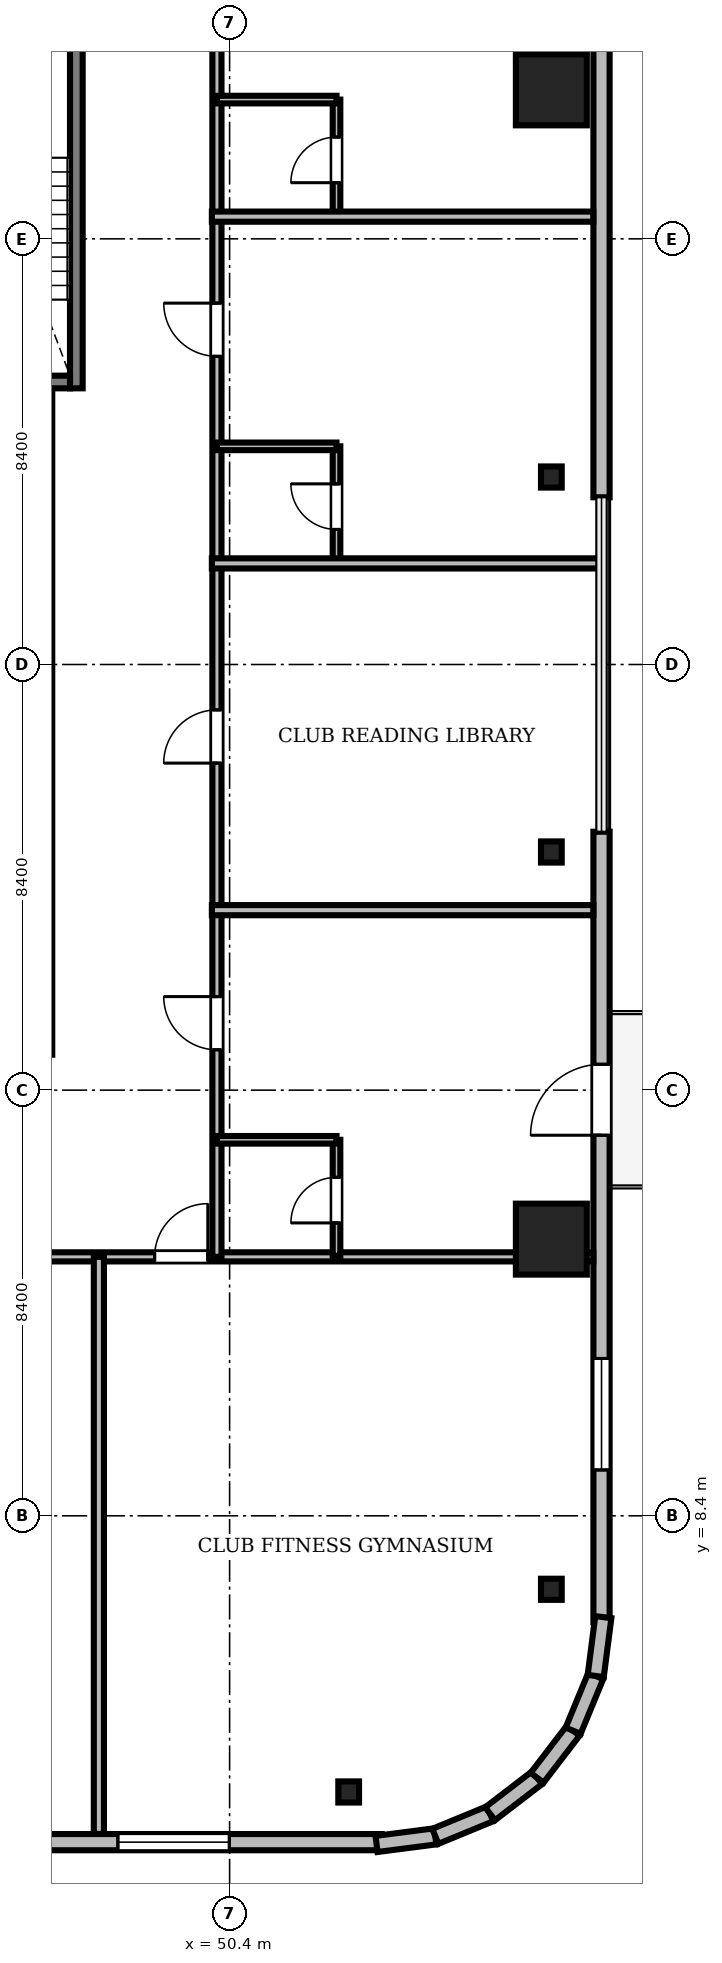
"""IFC4 building model, lengths in metres.
Left out: names, types, materials, properties, quantities, classifications, styles, units other than length and angle.
Written with IfcOpenShell. Run it as: python <this file> out.ifc"""

import sys

from ifc_helpers import new_model, si_unit, direction, frame, frame_2d, origin, origin_2d, place, context, subcontext, project, spatial, rectangle, i_section, extrude, source, transform, mapped, element, fill, save


model = new_model("IFC4")
c1 = context("Model", 3, precision=1e-05, world=origin(), true_north=direction((0.0, 1.0)))
c2 = subcontext(c1, "Body", "Model", "MODEL_VIEW")
j1 = project(units=[si_unit("LENGTHUNIT", "METRE"), si_unit("PLANEANGLEUNIT", "RADIAN")], contexts=[c1])
p1 = place(None, origin())
s1 = spatial("IfcSite", under=j1, at=p1, CompositionType="ELEMENT")
p2 = place(p1, origin())
s2 = spatial("IfcBuilding", under=s1, at=p2, CompositionType="ELEMENT")
p3 = place(p2, frame((0.0, 0.0, 214.8)))
s3 = spatial("IfcBuildingStorey", under=s2, at=p3, CompositionType="ELEMENT", Elevation=214.8)
m1 = source(origin(), c2, "Body", "SweptSolid", [
    extrude(rectangle(XDim=13.15, YDim=0.8, at=frame_2d((6.575, 0.0))), origin(), (0.0, 0.0, 1.0), 3.53),
])
p4 = place(p3, frame((46.5, 17.5, 0.0), z_axis=(0.0, 0.0, 1.0), x_axis=(0.0, 1.0, 0.0)))
e1 = element("IfcWall", 1, at=p4, inside=s3, PredefinedType="SHEAR", context=c2, shape_type="MappedRepresentation", body=[
    mapped(m1, transform((0.0, 0.0, 0.0), scale=1.0)),
])
m2 = source(origin(), c2, "Body", "SweptSolid", [
    extrude(rectangle(XDim=1.4, YDim=1.4, at=origin_2d()), origin(), (0.0, 0.0, 1.0), 3.53),
])
for number, where, z_axis, x_axis in (
    (2, (56.75, 13.86, 0.0), (0.0, 0.0, 1.0), (1.0, 0.0, 0.0)),
    (3, (56.75, 36.54, 0.0), (0.0, 0.0, 1.0), (1.0, 0.0, 0.0)),
):
    element("IfcColumn", number, at=place(p3, frame(where, z_axis=z_axis, x_axis=x_axis)), inside=s3, PredefinedType="COLUMN", context=c2, shape_type="MappedRepresentation", body=[
        mapped(m2, transform((0.0, 0.0, 0.0), scale=1.0)),
    ])
m3 = source(origin(), c2, "Body", "SweptSolid", [
    extrude(i_section(OverallWidth=0.409, OverallDepth=0.417, WebThickness=0.021, FlangeThickness=0.033, FilletRadius=0.015, at=origin_2d()), origin(), (0.0, 0.0, 1.0), 3.53),
])
for number, where, z_axis, x_axis in (
    (4, (52.75, 2.95, 0.0), (0.0, 0.0, 1.0), (1.0, 0.0, 0.0)),
    (5, (56.75, 6.95, 0.0), (0.0, 0.0, 1.0), (1.0, 0.0, 0.0)),
    (6, (56.75, 21.5, 0.0), (0.0, 0.0, 1.0), (1.0, 0.0, 0.0)),
    (7, (56.75, 28.9, 0.0), (0.0, 0.0, 1.0), (1.0, 0.0, 0.0)),
):
    element("IfcColumn", number, at=place(p3, frame(where, z_axis=z_axis, x_axis=x_axis)), inside=s3, PredefinedType="COLUMN", context=c2, shape_type="MappedRepresentation", body=[
        mapped(m3, transform((0.0, 0.0, 0.0), scale=1.0)),
    ])
m4 = source(origin(), c2, "Body", "SweptSolid", [
    extrude(rectangle(XDim=15.6, YDim=0.32, at=frame_2d((7.8, 0.0))), origin(), (0.0, 0.0, 1.0), 3.53),
])
p5 = place(p3, frame((37.8, 1.96, 0.0), z_axis=(0.0, 0.0, 1.0), x_axis=(1.0, 0.0, 0.0)))
e8 = element("IfcWall", 8, at=p5, inside=s3, PredefinedType="SOLIDWALL", context=c2, shape_type="MappedRepresentation", body=[
    mapped(m4, transform((0.0, 0.0, 0.0), scale=1.0)),
])
m5 = source(origin(), c2, "Body", "SweptSolid", [
    extrude(rectangle(XDim=1.4, YDim=2.3, at=frame_2d((0.7, 1.15))), frame((0.0, 0.17, 0.0), z_axis=(0.0, -1.0, 0.0), x_axis=(1.0, 0.0, 0.0)), (0.0, 0.0, 1.0), 0.34),
])
p6 = place(p5, frame((4.59, 0.0, 0.0)))
e9 = element("IfcOpeningElement", 9, at=p6, cuts=e8, PredefinedType="OPENING", context=c2, shape_type="MappedRepresentation", body=[
    mapped(m5, transform((0.0, 0.0, 0.0), scale=1.0)),
])
m6 = source(origin(), c2, "Body", "SweptSolid", [
    extrude(rectangle(XDim=2.2, YDim=2.4, at=frame_2d((1.1, 1.2))), frame((0.0, 0.17, 0.0), z_axis=(0.0, -1.0, 0.0), x_axis=(1.0, 0.0, 0.0)), (0.0, 0.0, 1.0), 0.34),
])
p7 = place(p5, frame((10.395, 0.0, 0.72)))
e10 = element("IfcOpeningElement", 10, at=p7, cuts=e8, PredefinedType="OPENING", context=c2, shape_type="MappedRepresentation", body=[
    mapped(m6, transform((0.0, 0.0, 0.0), scale=1.0)),
])
p8 = place(p3, frame((57.74, 6.3, 0.0), z_axis=(0.0, 0.0, 1.0), x_axis=(0.0, 1.0, 0.0)))
e11 = element("IfcWall", 11, at=p8, inside=s3, PredefinedType="SOLIDWALL", context=c2, shape_type="MappedRepresentation", body=[
    mapped(m4, transform((0.0, 0.0, 0.0), scale=1.0)),
])
p9 = place(p8, frame((9.61, 0.0, 0.0)))
e12 = element("IfcOpeningElement", 12, at=p9, cuts=e11, PredefinedType="OPENING", context=c2, shape_type="MappedRepresentation", body=[
    mapped(m5, transform((0.0, 0.0, 0.0), scale=1.0)),
])
p10 = place(p8, frame((3.005, 0.0, 0.72)))
e13 = element("IfcOpeningElement", 13, at=p10, cuts=e11, PredefinedType="OPENING", context=c2, shape_type="MappedRepresentation", body=[
    mapped(m6, transform((0.0, 0.0, 0.0), scale=1.0)),
])
m7 = source(origin(), c2, "Body", "SweptSolid", [
    extrude(rectangle(XDim=15.6, YDim=0.32, at=frame_2d((7.8, 0.0))), origin(), (0.0, 0.0, 1.0), 3.53),
])
p11 = place(p3, frame((57.74, 28.5, 0.0), z_axis=(0.0, 0.0, 1.0), x_axis=(0.0, 1.0, 0.0)))
e14 = element("IfcWall", 14, at=p11, inside=s3, PredefinedType="SOLIDWALL", context=c2, shape_type="MappedRepresentation", body=[
    mapped(m7, transform((0.0, 0.0, 0.0), scale=1.0)),
])
p12 = place(p11, frame((10.395, 0.0, 0.72)))
e15 = element("IfcOpeningElement", 15, at=p12, cuts=e14, PredefinedType="OPENING", context=c2, shape_type="MappedRepresentation", body=[
    mapped(m6, transform((0.0, 0.0, 0.0), scale=1.0)),
])
m8 = source(origin(), c2, "Body", "SweptSolid", [
    extrude(rectangle(XDim=1.17, YDim=0.32, at=frame_2d((0.585, 0.0))), origin(), (0.0, 0.0, 1.0), 3.53),
])
p13 = place(p3, frame((53.3, 1.925, 0.0), z_axis=(0.0, 0.0, 1.0), x_axis=(0.991762485493, 0.128090485085, 0.0)))
e16 = element("IfcWall", 16, at=p13, inside=s3, PredefinedType="SOLIDWALL", context=c2, shape_type="MappedRepresentation", body=[
    mapped(m8, transform((0.0, 0.0, 0.0), scale=1.0)),
])
m9 = source(origin(), c2, "Body", "SweptSolid", [
    extrude(rectangle(XDim=1.169, YDim=0.32, at=frame_2d((0.585, 0.0))), origin(), (0.0, 0.0, 1.0), 3.53),
])
p14 = place(p3, frame((54.46, 2.074, 0.0), z_axis=(0.0, 0.0, 1.0), x_axis=(0.924479075121, 0.381232789334, 0.0)))
e17 = element("IfcWall", 17, at=p14, inside=s3, PredefinedType="SOLIDWALL", context=c2, shape_type="MappedRepresentation", body=[
    mapped(m9, transform((0.0, 0.0, 0.0), scale=1.0)),
])
m10 = source(origin(), c2, "Body", "SweptSolid", [
    extrude(rectangle(XDim=1.169, YDim=0.32, at=frame_2d((0.584, 0.0))), origin(), (0.0, 0.0, 1.0), 3.53),
])
p15 = place(p3, frame((55.541, 2.52, 0.0), z_axis=(0.0, 0.0, 1.0), x_axis=(0.793663520347, 0.608356981114, 0.0)))
e18 = element("IfcWall", 18, at=p15, inside=s3, PredefinedType="SOLIDWALL", context=c2, shape_type="MappedRepresentation", body=[
    mapped(m10, transform((0.0, 0.0, 0.0), scale=1.0)),
])
m11 = source(origin(), c2, "Body", "SweptSolid", [
    extrude(rectangle(XDim=1.169, YDim=0.32, at=frame_2d((0.584, 0.0))), origin(), (0.0, 0.0, 1.0), 3.53),
])
for number, where, z_axis, x_axis in (
    (19, (56.469, 3.231, 0.0), (0.0, 0.0, 1.0), (0.608, 0.794, 0.0)),
    (20, (57.18, 4.159, 0.0), (0.0, 0.0, 1.0), (0.381, 0.925, 0.0)),
):
    element("IfcWall", number, at=place(p3, frame(where, z_axis=z_axis, x_axis=x_axis)), inside=s3, PredefinedType="SOLIDWALL", context=c2, shape_type="MappedRepresentation", body=[
        mapped(m11, transform((0.0, 0.0, 0.0), scale=1.0)),
    ])
m12 = source(origin(), c2, "Body", "SweptSolid", [
    extrude(rectangle(XDim=1.171, YDim=0.32, at=frame_2d((0.585, 0.0))), origin(), (0.0, 0.0, 1.0), 3.53),
])
p16 = place(p3, frame((57.625, 5.24, 0.0), z_axis=(0.0, 0.0, 1.0), x_axis=(0.128269133229, 0.991739395941, 0.0)))
e21 = element("IfcWall", 21, at=p16, inside=s3, PredefinedType="SOLIDWALL", context=c2, shape_type="MappedRepresentation", body=[
    mapped(m12, transform((0.0, 0.0, 0.0), scale=1.0)),
])
m13 = source(origin(), c2, "Body", "SweptSolid", [
    extrude(rectangle(XDim=9.25, YDim=0.25, at=frame_2d((4.625, 0.0))), origin(), (0.0, 0.0, 1.0), 3.55),
])
p17 = place(p3, frame((47.375, 30.65, 0.0), z_axis=(0.0, 0.0, 1.0), x_axis=(0.0, 1.0, 0.0)))
e22 = element("IfcWall", 22, at=p17, inside=s3, PredefinedType="SOLIDWALL", context=c2, shape_type="MappedRepresentation", body=[
    mapped(m13, transform((0.0, 0.0, 0.0), scale=1.0)),
])
m14 = source(origin(), c2, "Body", "SweptSolid", [
    extrude(rectangle(XDim=3.15, YDim=0.25, at=frame_2d((1.575, 0.0))), origin(), (0.0, 0.0, 1.0), 3.55),
])
p18 = place(p3, frame((44.1, 30.775, 0.0), z_axis=(0.0, 0.0, 1.0), x_axis=(1.0, 0.0, 0.0)))
e23 = element("IfcWall", 23, at=p18, inside=s3, PredefinedType="SOLIDWALL", context=c2, shape_type="MappedRepresentation", body=[
    mapped(m14, transform((0.0, 0.0, 0.0), scale=1.0)),
])
m15 = source(origin(), c2, "Body", "SweptSolid", [
    extrude(rectangle(XDim=1.1, YDim=2.2, at=frame_2d((0.55, 1.1))), frame((0.0, 0.135, 0.0), z_axis=(0.0, -1.0, 0.0), x_axis=(1.0, 0.0, 0.0)), (0.0, 0.0, 1.0), 0.27),
])
p19 = place(p18, frame((0.35, 0.0, 0.0)))
e24 = element("IfcOpeningElement", 24, at=p19, cuts=e23, PredefinedType="OPENING", context=c2, shape_type="MappedRepresentation", body=[
    mapped(m15, transform((0.0, 0.0, 0.0), scale=1.0)),
])
m16 = source(origin(), c2, "Body", "SweptSolid", [
    extrude(rectangle(XDim=46.156, YDim=0.18, at=frame_2d((23.078, 0.0))), origin(), (0.0, 0.0, 1.0), 2.772),
])
p20 = place(p3, frame((11.422, 13.51, 0.0), z_axis=(0.0, 0.0, 1.0), x_axis=(1.0, 0.0, 0.0)))
e25 = element("IfcWall", 25, at=p20, inside=s3, PredefinedType="PARTITIONING", context=c2, shape_type="MappedRepresentation", body=[
    mapped(m16, transform((0.0, 0.0, 0.0), scale=1.0)),
])
m17 = source(origin(), c2, "Body", "SweptSolid", [
    extrude(rectangle(XDim=1.05, YDim=2.2, at=frame_2d((0.525, 1.1))), frame((0.0, 0.1, 0.0), z_axis=(0.0, -1.0, 0.0), x_axis=(1.0, 0.0, 0.0)), (0.0, 0.0, 1.0), 0.2),
])
p21 = place(p20, frame((8.398, 0.0, 0.0)))
e26 = element("IfcOpeningElement", 26, at=p21, cuts=e25, PredefinedType="OPENING", context=c2, shape_type="MappedRepresentation", body=[
    mapped(m17, transform((0.0, 0.0, 0.0), scale=1.0)),
])
p22 = place(p20, frame((10.953, 0.0, 0.0)))
e27 = element("IfcOpeningElement", 27, at=p22, cuts=e25, PredefinedType="OPENING", context=c2, shape_type="MappedRepresentation", body=[
    mapped(m17, transform((0.0, 0.0, 0.0), scale=1.0)),
])
p23 = place(p20, frame((14.645, 0.0, 0.0)))
e28 = element("IfcOpeningElement", 28, at=p23, cuts=e25, PredefinedType="OPENING", context=c2, shape_type="MappedRepresentation", body=[
    mapped(m17, transform((0.0, 0.0, 0.0), scale=1.0)),
])
m18 = source(origin(), c2, "Body", "SweptSolid", [
    extrude(rectangle(XDim=0.95, YDim=2.15, at=frame_2d((0.475, 1.075))), frame((0.0, 0.1, 0.0), z_axis=(0.0, -1.0, 0.0), x_axis=(1.0, 0.0, 0.0)), (0.0, 0.0, 1.0), 0.2),
])
p24 = place(p20, frame((20.057, 0.0, 0.0)))
e29 = element("IfcOpeningElement", 29, at=p24, cuts=e25, PredefinedType="OPENING", context=c2, shape_type="MappedRepresentation", body=[
    mapped(m18, transform((0.0, 0.0, 0.0), scale=1.0)),
])
p25 = place(p20, frame((23.274, 0.0, 0.0)))
e30 = element("IfcOpeningElement", 30, at=p25, cuts=e25, PredefinedType="OPENING", context=c2, shape_type="MappedRepresentation", body=[
    mapped(m17, transform((0.0, 0.0, 0.0), scale=1.0)),
])
p26 = place(p20, frame((27.716, 0.0, 0.0)))
e31 = element("IfcOpeningElement", 31, at=p26, cuts=e25, PredefinedType="OPENING", context=c2, shape_type="MappedRepresentation", body=[
    mapped(m17, transform((0.0, 0.0, 0.0), scale=1.0)),
])
p27 = place(p20, frame((32.907, 0.0, 0.0)))
e32 = element("IfcOpeningElement", 32, at=p27, cuts=e25, PredefinedType="OPENING", context=c2, shape_type="MappedRepresentation", body=[
    mapped(m17, transform((0.0, 0.0, 0.0), scale=1.0)),
])
p28 = place(p20, frame((37.498, 0.0, 0.0)))
e33 = element("IfcOpeningElement", 33, at=p28, cuts=e25, PredefinedType="OPENING", context=c2, shape_type="MappedRepresentation", body=[
    mapped(m17, transform((0.0, 0.0, 0.0), scale=1.0)),
])
m19 = source(origin(), c2, "Body", "SweptSolid", [
    extrude(rectangle(XDim=27.59, YDim=0.18, at=frame_2d((13.795, 0.0))), origin(), (0.0, 0.0, 1.0), 2.972),
])
p29 = place(p3, frame((50.15, 13.51, 0.0), z_axis=(0.0, 0.0, 1.0), x_axis=(0.0, 1.0, 0.0)))
e34 = element("IfcWall", 34, at=p29, inside=s3, PredefinedType="PARTITIONING", context=c2, shape_type="MappedRepresentation", body=[
    mapped(m19, transform((0.0, 0.0, 0.0), scale=1.0)),
])
p30 = place(p29, frame((4.086, 0.0, 0.0)))
e35 = element("IfcOpeningElement", 35, at=p30, cuts=e34, PredefinedType="OPENING", context=c2, shape_type="MappedRepresentation", body=[
    mapped(m17, transform((0.0, 0.0, 0.0), scale=1.0)),
])
p31 = place(p29, frame((9.744, 0.0, 0.0)))
e36 = element("IfcOpeningElement", 36, at=p31, cuts=e34, PredefinedType="OPENING", context=c2, shape_type="MappedRepresentation", body=[
    mapped(m17, transform((0.0, 0.0, 0.0), scale=1.0)),
])
p32 = place(p29, frame((17.771, 0.0, 0.0)))
e37 = element("IfcOpeningElement", 37, at=p32, cuts=e34, PredefinedType="OPENING", context=c2, shape_type="MappedRepresentation", body=[
    mapped(m17, transform((0.0, 0.0, 0.0), scale=1.0)),
])
p33 = place(p29, frame((24.614, 0.0, 0.0)))
e38 = element("IfcOpeningElement", 38, at=p33, cuts=e34, PredefinedType="OPENING", context=c2, shape_type="MappedRepresentation", body=[
    mapped(m17, transform((0.0, 0.0, 0.0), scale=1.0)),
])
m20 = source(origin(), c2, "Body", "SweptSolid", [
    extrude(rectangle(XDim=2.29, YDim=0.15, at=frame_2d((1.145, 0.0))), origin(), (0.0, 0.0, 1.0), 2.972),
])
p34 = place(p3, frame((52.51, 13.53, 0.0), z_axis=(0.0, 0.0, 1.0), x_axis=(0.0, 1.0, 0.0)))
e39 = element("IfcWall", 39, at=p34, inside=s3, PredefinedType="PARTITIONING", context=c2, shape_type="MappedRepresentation", body=[
    mapped(m20, transform((0.0, 0.0, 0.0), scale=1.0)),
])
m21 = source(origin(), c2, "Body", "SweptSolid", [
    extrude(rectangle(XDim=0.9, YDim=2.1, at=frame_2d((0.45, 1.05))), frame((0.0, 0.085, 0.0), z_axis=(0.0, -1.0, 0.0), x_axis=(1.0, 0.0, 0.0)), (0.0, 0.0, 1.0), 0.17),
])
p35 = place(p34, frame((0.65, 0.0, 0.0)))
e40 = element("IfcOpeningElement", 40, at=p35, cuts=e39, PredefinedType="OPENING", context=c2, shape_type="MappedRepresentation", body=[
    mapped(m21, transform((0.0, 0.0, 0.0), scale=1.0)),
])
m22 = source(origin(), c2, "Body", "SweptSolid", [
    extrude(rectangle(XDim=2.29, YDim=0.15, at=frame_2d((1.145, 0.0))), origin(), (0.0, 0.0, 1.0), 2.972),
])
p36 = place(p3, frame((52.51, 27.215, 0.0), z_axis=(0.0, 0.0, 1.0), x_axis=(0.0, 1.0, 0.0)))
e41 = element("IfcWall", 41, at=p36, inside=s3, PredefinedType="PARTITIONING", context=c2, shape_type="MappedRepresentation", body=[
    mapped(m22, transform((0.0, 0.0, 0.0), scale=1.0)),
])
p37 = place(p36, frame((0.65, 0.0, 0.0)))
e42 = element("IfcOpeningElement", 42, at=p37, cuts=e41, PredefinedType="OPENING", context=c2, shape_type="MappedRepresentation", body=[
    mapped(m21, transform((0.0, 0.0, 0.0), scale=1.0)),
])
m23 = source(origin(), c2, "Body", "SweptSolid", [
    extrude(rectangle(XDim=2.29, YDim=0.15, at=frame_2d((1.145, 0.0))), origin(), (0.0, 0.0, 1.0), 3.53),
])
p38 = place(p3, frame((52.51, 34.058, 0.0), z_axis=(0.0, 0.0, 1.0), x_axis=(0.0, 1.0, 0.0)))
e43 = element("IfcWall", 43, at=p38, inside=s3, PredefinedType="PARTITIONING", context=c2, shape_type="MappedRepresentation", body=[
    mapped(m23, transform((0.0, 0.0, 0.0), scale=1.0)),
])
p39 = place(p38, frame((0.65, 0.0, 0.0)))
e44 = element("IfcOpeningElement", 44, at=p39, cuts=e43, PredefinedType="OPENING", context=c2, shape_type="MappedRepresentation", body=[
    mapped(m21, transform((0.0, 0.0, 0.0), scale=1.0)),
])
m24 = source(origin(), c2, "Body", "SweptSolid", [
    extrude(rectangle(XDim=11.388, YDim=0.2, at=frame_2d((5.694, 0.0))), origin(), (0.0, 0.0, 1.0), 2.772),
])
p40 = place(p3, frame((47.82, 2.122, 0.0), z_axis=(0.0, 0.0, 1.0), x_axis=(0.0, 1.0, 0.0)))
e45 = element("IfcWall", 45, at=p40, inside=s3, PredefinedType="PARTITIONING", context=c2, shape_type="MappedRepresentation", body=[
    mapped(m24, transform((0.0, 0.0, 0.0), scale=1.0)),
])
m25 = source(origin(), c2, "Body", "SweptSolid", [
    extrude(rectangle(XDim=7.528, YDim=0.2, at=frame_2d((3.764, 0.0))), origin(), (0.0, 0.0, 1.0), 2.772),
])
p41 = place(p3, frame((50.05, 20.352, 0.0), z_axis=(0.0, 0.0, 1.0), x_axis=(1.0, 0.0, 0.0)))
e46 = element("IfcWall", 46, at=p41, inside=s3, PredefinedType="PARTITIONING", context=c2, shape_type="MappedRepresentation", body=[
    mapped(m25, transform((0.0, 0.0, 0.0), scale=1.0)),
])
m26 = source(origin(), c2, "Body", "SweptSolid", [
    extrude(rectangle(XDim=7.72, YDim=0.2, at=frame_2d((3.86, 0.0))), origin(), (0.0, 0.0, 1.0), 2.772),
])
p42 = place(p3, frame((50.05, 27.195, 0.0), z_axis=(0.0, 0.0, 1.0), x_axis=(1.0, 0.0, 0.0)))
e47 = element("IfcWall", 47, at=p42, inside=s3, PredefinedType="PARTITIONING", context=c2, shape_type="MappedRepresentation", body=[
    mapped(m26, transform((0.0, 0.0, 0.0), scale=1.0)),
])
p43 = place(p3, frame((50.05, 34.038, 0.0), z_axis=(0.0, 0.0, 1.0), x_axis=(1.0, 0.0, 0.0)))
e48 = element("IfcWall", 48, at=p43, inside=s3, PredefinedType="PARTITIONING", context=c2, shape_type="MappedRepresentation", body=[
    mapped(m25, transform((0.0, 0.0, 0.0), scale=1.0)),
])
m27 = source(origin(), c2, "Body", "SweptSolid", [
    extrude(rectangle(XDim=2.36, YDim=0.15, at=frame_2d((1.18, 0.0))), origin(), (0.0, 0.0, 1.0), 3.53),
])
for number, where, z_axis, x_axis in (
    (49, (50.15, 15.82, 0.0), (0.0, 0.0, 1.0), (1.0, 0.0, 0.0)),
    (50, (50.15, 29.505, 0.0), (0.0, 0.0, 1.0), (1.0, 0.0, 0.0)),
    (51, (50.15, 36.348, 0.0), (0.0, 0.0, 1.0), (1.0, 0.0, 0.0)),
):
    element("IfcWall", number, at=place(p3, frame(where, z_axis=z_axis, x_axis=x_axis)), inside=s3, PredefinedType="PARTITIONING", context=c2, shape_type="MappedRepresentation", body=[
        mapped(m27, transform((0.0, 0.0, 0.0), scale=1.0)),
    ])
m28 = source(origin(), c2, "Body", "SweptSolid", [
    extrude(rectangle(XDim=2.2, YDim=2.4, at=frame_2d((1.1, 1.2))), frame((0.0, 0.03, 0.0), z_axis=(0.0, -1.0, 0.0), x_axis=(1.0, 0.0, 0.0)), (0.0, 0.0, 1.0), 0.06),
])
p44 = place(p7, origin())
e52 = element("IfcWindow", 52, at=p44, inside=s3, PartitioningType="SINGLE_PANEL", PredefinedType="WINDOW", context=c2, shape_type="MappedRepresentation", body=[
    mapped(m28, transform((0.0, 0.0, 0.0), scale=1.0)),
])
fill(e10, e52)
m29 = source(origin(), c2, "Body", "SweptSolid", [
    extrude(rectangle(XDim=1.4, YDim=2.3, at=frame_2d((0.7, 1.15))), frame((0.0, 0.025, 0.0), z_axis=(0.0, -1.0, 0.0), x_axis=(1.0, 0.0, 0.0)), (0.0, 0.0, 1.0), 0.05),
])
p45 = place(p9, frame((1.4, 0.0, 0.0), z_axis=(0.0, 0.0, 1.0), x_axis=(-1.0, 0.0, 0.0)))
e53 = element("IfcDoor", 53, at=p45, inside=s3, OperationType="DOUBLE_DOOR_SLIDING", PredefinedType="DOOR", context=c2, shape_type="MappedRepresentation", body=[
    mapped(m29, transform((0.0, 0.0, 0.0), scale=1.0)),
])
fill(e12, e53)
p46 = place(p10, origin())
e54 = element("IfcWindow", 54, at=p46, inside=s3, PartitioningType="SINGLE_PANEL", PredefinedType="WINDOW", context=c2, shape_type="MappedRepresentation", body=[
    mapped(m28, transform((0.0, 0.0, 0.0), scale=1.0)),
])
fill(e13, e54)
m30 = source(origin(), c2, "Body", "SweptSolid", [
    extrude(rectangle(XDim=1.05, YDim=2.2, at=frame_2d((0.525, 1.1))), frame((0.0, 0.025, 0.0), z_axis=(0.0, -1.0, 0.0), x_axis=(1.0, 0.0, 0.0)), (0.0, 0.0, 1.0), 0.05),
])
p47 = place(p28, origin())
e55 = element("IfcDoor", 55, at=p47, inside=s3, OperationType="SINGLE_SWING_RIGHT", PredefinedType="DOOR", context=c2, shape_type="MappedRepresentation", body=[
    mapped(m30, transform((0.0, 0.0, 0.0), scale=1.0)),
])
fill(e33, e55)
p48 = place(p30, origin())
e56 = element("IfcDoor", 56, at=p48, inside=s3, OperationType="SINGLE_SWING_RIGHT", PredefinedType="DOOR", context=c2, shape_type="MappedRepresentation", body=[
    mapped(m30, transform((0.0, 0.0, 0.0), scale=1.0)),
])
fill(e35, e56)
p49 = place(p31, origin())
e57 = element("IfcDoor", 57, at=p49, inside=s3, OperationType="SINGLE_SWING_LEFT", PredefinedType="DOOR", context=c2, shape_type="MappedRepresentation", body=[
    mapped(m30, transform((0.0, 0.0, 0.0), scale=1.0)),
])
fill(e36, e57)
p50 = place(p32, origin())
e58 = element("IfcDoor", 58, at=p50, inside=s3, OperationType="SINGLE_SWING_RIGHT", PredefinedType="DOOR", context=c2, shape_type="MappedRepresentation", body=[
    mapped(m30, transform((0.0, 0.0, 0.0), scale=1.0)),
])
fill(e37, e58)
m31 = source(origin(), c2, "Body", "SweptSolid", [
    extrude(rectangle(XDim=0.9, YDim=2.1, at=frame_2d((0.45, 1.05))), frame((0.0, 0.025, 0.0), z_axis=(0.0, -1.0, 0.0), x_axis=(1.0, 0.0, 0.0)), (0.0, 0.0, 1.0), 0.05),
])
p51 = place(p35, origin())
e59 = element("IfcDoor", 59, at=p51, inside=s3, OperationType="SINGLE_SWING_LEFT", PredefinedType="DOOR", context=c2, shape_type="MappedRepresentation", body=[
    mapped(m31, transform((0.0, 0.0, 0.0), scale=1.0)),
])
fill(e40, e59)
p52 = place(p37, origin())
e60 = element("IfcDoor", 60, at=p52, inside=s3, OperationType="SINGLE_SWING_RIGHT", PredefinedType="DOOR", context=c2, shape_type="MappedRepresentation", body=[
    mapped(m31, transform((0.0, 0.0, 0.0), scale=1.0)),
])
fill(e42, e60)
p53 = place(p39, origin())
e61 = element("IfcDoor", 61, at=p53, inside=s3, OperationType="SINGLE_SWING_LEFT", PredefinedType="DOOR", context=c2, shape_type="MappedRepresentation", body=[
    mapped(m31, transform((0.0, 0.0, 0.0), scale=1.0)),
])
fill(e44, e61)
save(model, sys.argv[1])
